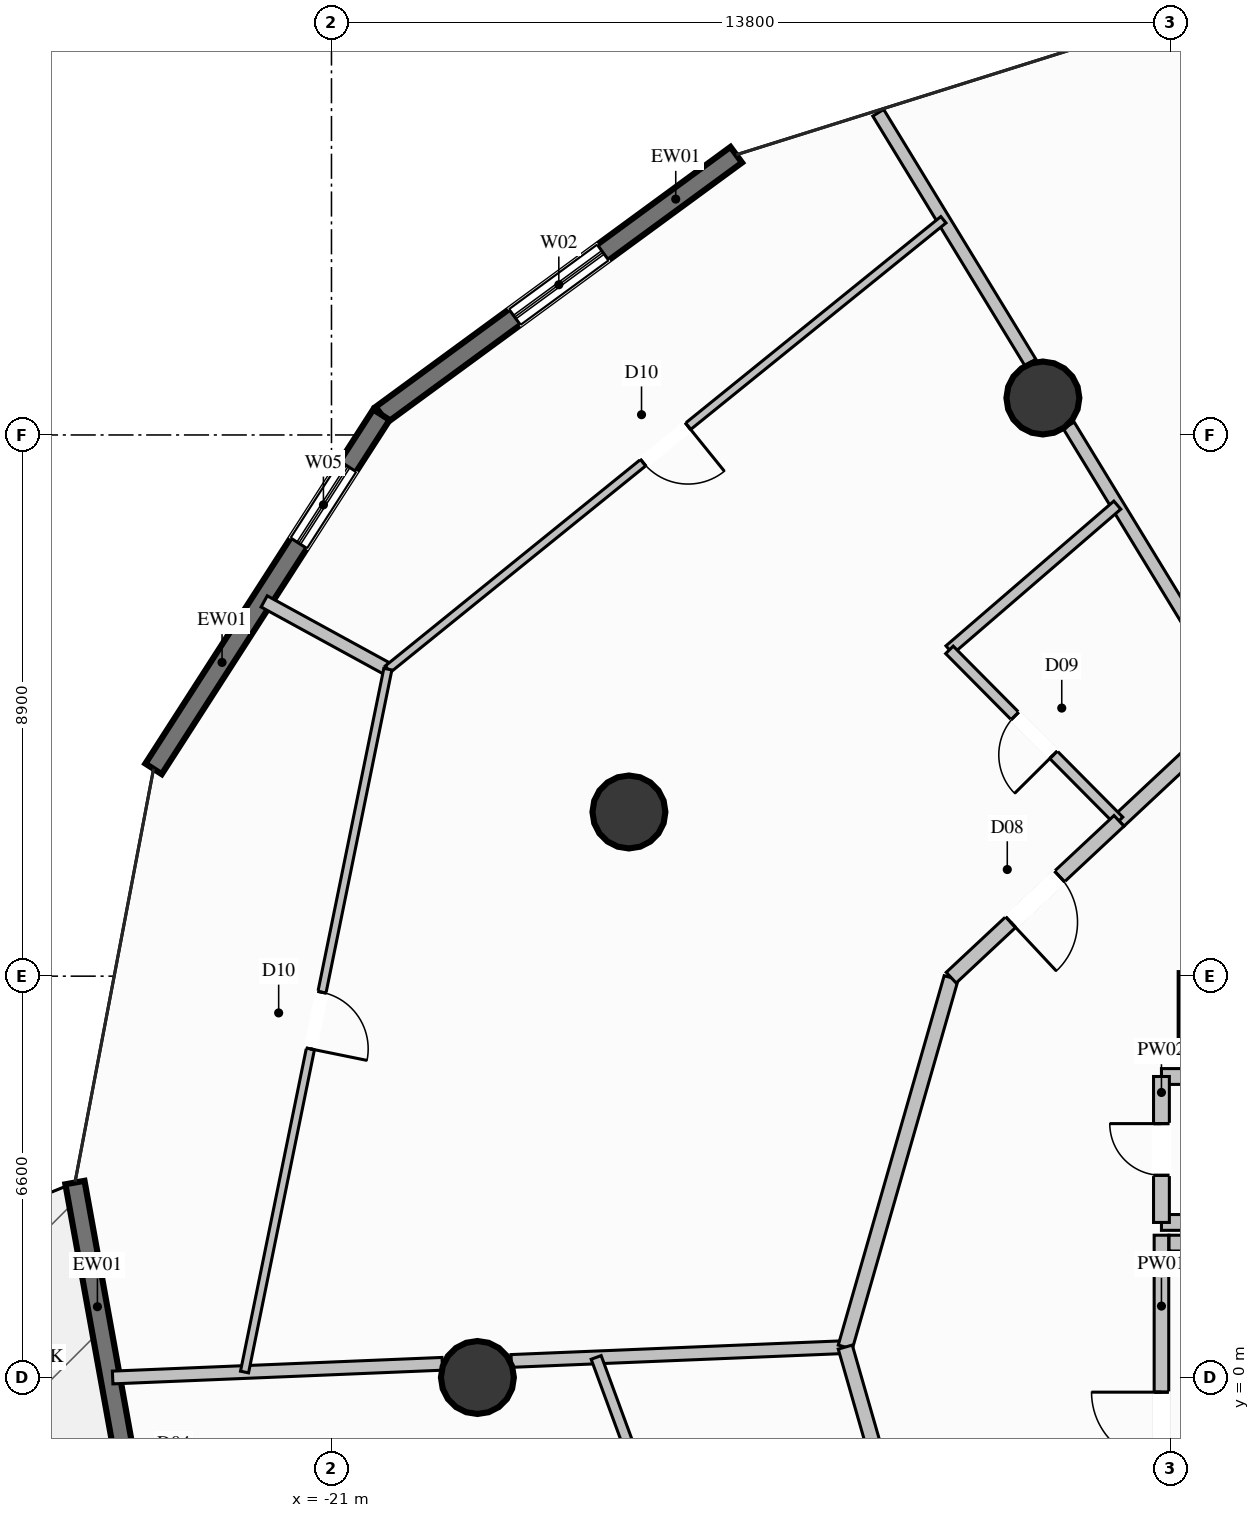
"""IFC4 building model, lengths in metres.
Left out: names, types, materials, properties, quantities, classifications, styles, units other than length and angle.
Written with IfcOpenShell. Run it as: python <this file> out.ifc"""

import sys

from ifc_helpers import new_model, si_unit, direction, frame, frame_2d, origin, origin_2d, place, context, subcontext, project, spatial, rectangle, circle, extrude, element, fill, save


model = new_model("IFC4")
c1 = context("Model", 3, precision=1e-05, world=origin(), true_north=direction((0.0, 1.0)))
c2 = subcontext(c1, "Body", "Model", "MODEL_VIEW")
j1 = project(units=[si_unit("LENGTHUNIT", "METRE"), si_unit("PLANEANGLEUNIT", "RADIAN")], contexts=[c1])
p1 = place(None, origin())
s1 = spatial("IfcSite", under=j1, at=p1, CompositionType="ELEMENT")
p2 = place(p1, origin())
s2 = spatial("IfcBuilding", under=s1, at=p2, CompositionType="ELEMENT")
p3 = place(p2, frame((0.0, 0.0, 78.8)))
s3 = spatial("IfcBuildingStorey", under=s2, at=p3, CompositionType="ELEMENT", Elevation=78.8)
p4 = place(p3, frame((-6.5, 6.1, 0.0), z_axis=(0.0, 0.0, 1.0), x_axis=(1.0, 0.0, 0.0)))
e1 = element("IfcColumn", 1, at=p4, inside=s3, PredefinedType="COLUMN", context=c2, shape_type="SweptSolid", body=[
    extrude(rectangle(XDim=1.1, YDim=1.1, at=origin_2d()), origin(), (0.0, 0.0, 1.0), 3.6),
])
for number, where, z_axis, x_axis in (
    (2, (-9.3, 16.108, 0.0), (0.0, 0.0, 1.0), (1.0, 0.0, 0.0)),
    (3, (-16.108, 9.3, 0.0), (0.0, 0.0, 1.0), (1.0, 0.0, 0.0)),
    (4, (-18.6, 0.0, 0.0), (0.0, 0.0, 1.0), (1.0, 0.0, 0.0)),
):
    element("IfcColumn", number, at=place(p3, frame(where, z_axis=z_axis, x_axis=x_axis)), inside=s3, PredefinedType="COLUMN", context=c2, shape_type="SweptSolid", body=[
        extrude(circle(Radius=0.6, at=origin_2d()), origin(), (0.0, 0.0, 1.0), 3.6),
    ])
p5 = place(p3, frame((-20.179, 15.833, 0.0), z_axis=(0.0, 0.0, 1.0), x_axis=(0.806720320821, 0.59093343447, 0.0)))
e5 = element("IfcWall", 5, at=p5, inside=s3, PredefinedType="SOLIDWALL", context=c2, shape_type="SweptSolid", body=[
    extrude(rectangle(XDim=7.234, YDim=0.32, at=frame_2d((3.617, 0.0))), origin(), (0.0, 0.0, 1.0), 3.34),
])
p6 = place(p5, frame((2.717, 0.0, 0.35)))
e6 = element("IfcOpeningElement", 6, at=p6, cuts=e5, PredefinedType="OPENING", context=c2, shape_type="SweptSolid", body=[
    extrude(rectangle(XDim=1.8, YDim=2.6, at=frame_2d((0.9, 1.3))), frame((0.0, 0.17, 0.0), z_axis=(0.0, -1.0, 0.0), x_axis=(1.0, 0.0, 0.0)), (0.0, 0.0, 1.0), 0.34),
])
p7 = place(p3, frame((-23.926, 10.009, 0.0), z_axis=(0.0, 0.0, 1.0), x_axis=(0.541072927061, 0.840975675987, 0.0)))
e7 = element("IfcWall", 7, at=p7, inside=s3, PredefinedType="SOLIDWALL", context=c2, shape_type="SweptSolid", body=[
    extrude(rectangle(XDim=6.925, YDim=0.32, at=frame_2d((3.463, 0.0))), origin(), (0.0, 0.0, 1.0), 3.34),
])
p8 = place(p7, frame((4.413, 0.0, 0.85)))
e8 = element("IfcOpeningElement", 8, at=p8, cuts=e7, PredefinedType="OPENING", context=c2, shape_type="SweptSolid", body=[
    extrude(rectangle(XDim=1.5, YDim=1.2, at=frame_2d((0.75, 0.6))), frame((0.0, 0.17, 0.0), z_axis=(0.0, -1.0, 0.0), x_axis=(1.0, 0.0, 0.0)), (0.0, 0.0, 1.0), 0.34),
])
p9 = place(p3, frame((-23.931, -3.912, 0.0), z_axis=(0.0, 0.0, 1.0), x_axis=(-0.178065653106, 0.984018609165, 0.0)))
e9 = element("IfcWall", 9, at=p9, inside=s3, PredefinedType="SOLIDWALL", context=c2, shape_type="SweptSolid", body=[
    extrude(rectangle(XDim=7.234, YDim=0.32, at=frame_2d((3.617, 0.0))), origin(), (0.0, 0.0, 1.0), 3.34),
])
p10 = place(p9, frame((1.234, 0.0, 0.0)))
e10 = element("IfcOpeningElement", 10, at=p10, cuts=e9, PredefinedType="OPENING", context=c2, shape_type="SweptSolid", body=[
    extrude(rectangle(XDim=1.6, YDim=2.3, at=frame_2d((0.8, 1.15))), frame((0.0, 0.17, 0.0), z_axis=(0.0, -1.0, 0.0), x_axis=(1.0, 0.0, 0.0)), (0.0, 0.0, 1.0), 0.34),
])
p11 = place(p3, frame((-7.35, -2.78, 0.0), z_axis=(0.0, 0.0, 1.0), x_axis=(0.0, 1.0, 0.0)))
e11 = element("IfcWall", 11, at=p11, inside=s3, PredefinedType="PARTITIONING", context=c2, shape_type="SweptSolid", body=[
    extrude(rectangle(XDim=5.12, YDim=0.24, at=frame_2d((2.56, 0.0))), origin(), (0.0, 0.0, 1.0), 2.425),
])
p12 = place(p11, frame((1.389, 0.0, 0.0)))
e12 = element("IfcOpeningElement", 12, at=p12, cuts=e11, PredefinedType="OPENING", context=c2, shape_type="SweptSolid", body=[
    extrude(rectangle(XDim=1.15, YDim=2.2, at=frame_2d((0.575, 1.1))), frame((0.0, 0.13, 0.0), z_axis=(0.0, -1.0, 0.0), x_axis=(1.0, 0.0, 0.0)), (0.0, 0.0, 1.0), 0.26),
])
p13 = place(p3, frame((-7.225, 2.21, 0.0), z_axis=(0.0, 0.0, 1.0), x_axis=(1.0, 0.0, 0.0)))
e13 = element("IfcWall", 13, at=p13, inside=s3, PredefinedType="PARTITIONING", context=c2, shape_type="SweptSolid", body=[
    extrude(rectangle(XDim=0.875, YDim=0.26, at=frame_2d((0.438, 0.0))), origin(), (0.0, 0.0, 1.0), 3.34),
])
for number, where, z_axis, x_axis in (
    (14, (-7.35, 4.95, 0.0), (0.0, 0.0, 1.0), (1.0, 0.0, 0.0)),
    (15, (-7.35, 2.55, 0.0), (0.0, 0.0, 1.0), (1.0, 0.0, 0.0)),
):
    element("IfcWall", number, at=place(p3, frame(where, z_axis=z_axis, x_axis=x_axis)), inside=s3, PredefinedType="PARTITIONING", context=c2, shape_type="SweptSolid", body=[
        extrude(rectangle(XDim=0.93, YDim=0.26, at=frame_2d((0.465, 0.0))), origin(), (0.0, 0.0, 1.0), 3.34),
    ])
p14 = place(p3, frame((-7.35, 2.55, 0.0), z_axis=(0.0, 0.0, 1.0), x_axis=(0.0, 1.0, 0.0)))
e16 = element("IfcWall", 16, at=p14, inside=s3, PredefinedType="PARTITIONING", context=c2, shape_type="SweptSolid", body=[
    extrude(rectangle(XDim=2.4, YDim=0.26, at=frame_2d((1.2, 0.0))), origin(), (0.0, 0.0, 1.0), 2.425),
])
p15 = place(p14, frame((0.775, 0.0, 0.0)))
e17 = element("IfcOpeningElement", 17, at=p15, cuts=e16, PredefinedType="OPENING", context=c2, shape_type="SweptSolid", body=[
    extrude(rectangle(XDim=0.85, YDim=2.05, at=frame_2d((0.425, 1.025))), frame((0.0, 0.14, 0.0), z_axis=(0.0, -1.0, 0.0), x_axis=(1.0, 0.0, 0.0)), (0.0, 0.0, 1.0), 0.28),
])
p16 = place(p3, frame((-6.05, 11.022, 0.0), z_axis=(0.0, 0.0, 1.0), x_axis=(-0.520436280321, 0.85390050833, 0.0)))
e18 = element("IfcWall", 18, at=p16, inside=s3, PredefinedType="PARTITIONING", context=c2, shape_type="SweptSolid", body=[
    extrude(rectangle(XDim=5.428, YDim=0.21, at=frame_2d((2.714, 0.0))), origin(), (0.0, 0.0, 1.0), 2.708),
])
p17 = place(p3, frame((-9.506, 16.693, 0.0), z_axis=(0.0, 0.0, 1.0), x_axis=(-0.52035281633, 0.853951372467, 0.0)))
e19 = element("IfcWall", 19, at=p17, inside=s3, PredefinedType="PARTITIONING", context=c2, shape_type="SweptSolid", body=[
    extrude(rectangle(XDim=4.808, YDim=0.21, at=frame_2d((2.404, 0.0))), origin(), (0.0, 0.0, 1.0), 3.34),
])
p18 = place(p3, frame((-12.55, 0.5, 0.0), z_axis=(0.0, 0.0, 1.0), x_axis=(-0.999139449334, -0.041477232129, 0.0)))
e20 = element("IfcWall", 20, at=p18, inside=s3, PredefinedType="PARTITIONING", context=c2, shape_type="SweptSolid", body=[
    extrude(rectangle(XDim=5.498, YDim=0.21, at=frame_2d((2.749, 0.0))), origin(), (0.0, 0.0, 1.0), 2.421),
])
p19 = place(p3, frame((-19.178, 0.225, 0.0), z_axis=(0.0, 0.0, 1.0), x_axis=(-0.999139067382, -0.04148643189, 0.0)))
e21 = element("IfcWall", 21, at=p19, inside=s3, PredefinedType="PARTITIONING", context=c2, shape_type="SweptSolid", body=[
    extrude(rectangle(XDim=5.426, YDim=0.21, at=frame_2d((2.713, 0.0))), origin(), (0.0, 0.0, 1.0), 2.421),
])
p20 = place(p3, frame((-6.05, 11.022, 0.0), z_axis=(0.0, 0.0, 1.0), x_axis=(-0.730494026404, -0.682919085535, 0.0)))
e22 = element("IfcWall", 22, at=p20, inside=s3, PredefinedType="PARTITIONING", context=c2, shape_type="SweptSolid", body=[
    extrude(rectangle(XDim=2.735, YDim=0.24, at=frame_2d((1.368, 0.0))), origin(), (0.0, 0.0, 1.0), 3.34),
])
p21 = place(p3, frame((-8.076, 14.346, 0.0), z_axis=(0.0, 0.0, 1.0), x_axis=(-0.757447652271, -0.652895898341, 0.0)))
e23 = element("IfcWall", 23, at=p21, inside=s3, PredefinedType="PLUMBINGWALL", context=c2, shape_type="SweptSolid", body=[
    extrude(rectangle(XDim=3.645, YDim=0.175, at=frame_2d((1.823, 0.0))), origin(), (0.0, 0.0, 1.0), 3.34),
])
p22 = place(p3, frame((-8.048, 9.154, 0.0), z_axis=(0.0, 0.0, 1.0), x_axis=(-0.704172573675, 0.710028863135, 0.0)))
e24 = element("IfcWall", 24, at=p22, inside=s3, PredefinedType="PLUMBINGWALL", context=c2, shape_type="SweptSolid", body=[
    extrude(rectangle(XDim=3.96, YDim=0.175, at=frame_2d((1.98, 0.0))), origin(), (0.0, 0.0, 1.0), 3.34),
])
p23 = place(p22, frame((1.53, 0.0, 0.0)))
e25 = element("IfcOpeningElement", 25, at=p23, cuts=e24, PredefinedType="OPENING", context=c2, shape_type="SweptSolid", body=[
    extrude(rectangle(XDim=0.9, YDim=2.1, at=frame_2d((0.45, 1.05))), frame((0.0, 0.098, 0.0), z_axis=(0.0, -1.0, 0.0), x_axis=(1.0, 0.0, 0.0)), (0.0, 0.0, 1.0), 0.195),
])
p24 = place(p3, frame((-20.073, 11.649, 0.0), z_axis=(0.0, 0.0, 1.0), x_axis=(-0.877061418116, 0.480378256015, 0.0)))
e26 = element("IfcWall", 26, at=p24, inside=s3, PredefinedType="PARTITIONING", context=c2, shape_type="SweptSolid", body=[
    extrude(rectangle(XDim=2.319, YDim=0.21, at=frame_2d((1.16, 0.0))), origin(), (0.0, 0.0, 1.0), 3.34),
])
p25 = place(p3, frame((-10.808, 6.575, 0.0), z_axis=(0.0, 0.0, 1.0), x_axis=(-0.275634306148, -0.961262570412, 0.0)))
e27 = element("IfcWall", 27, at=p25, inside=s3, PredefinedType="PARTITIONING", context=c2, shape_type="SweptSolid", body=[
    extrude(rectangle(XDim=6.32, YDim=0.24, at=frame_2d((3.16, 0.0))), origin(), (0.0, 0.0, 1.0), 3.34),
])
p26 = place(p3, frame((-8.048, 9.154, 0.0), z_axis=(0.0, 0.0, 1.0), x_axis=(-0.73064678366, -0.682755649941, 0.0)))
e28 = element("IfcWall", 28, at=p26, inside=s3, PredefinedType="PARTITIONING", context=c2, shape_type="SweptSolid", body=[
    extrude(rectangle(XDim=3.778, YDim=0.24, at=frame_2d((1.889, 0.0))), origin(), (0.0, 0.0, 1.0), 3.34),
])
p27 = place(p26, frame((1.339, 0.0, 0.0)))
e29 = element("IfcOpeningElement", 29, at=p27, cuts=e28, PredefinedType="OPENING", context=c2, shape_type="SweptSolid", body=[
    extrude(rectangle(XDim=1.1, YDim=2.3, at=frame_2d((0.55, 1.15))), frame((0.0, 0.13, 0.0), z_axis=(0.0, -1.0, 0.0), x_axis=(1.0, 0.0, 0.0)), (0.0, 0.0, 1.0), 0.26),
])
p28 = place(p3, frame((-10.936, 19.039, 0.0), z_axis=(0.0, 0.0, 1.0), x_axis=(-0.777513312779, -0.628866479033, 0.0)))
e30 = element("IfcWall", 30, at=p28, inside=s3, PredefinedType="PARTITIONING", context=c2, shape_type="SweptSolid", body=[
    extrude(rectangle(XDim=11.751, YDim=0.135, at=frame_2d((5.876, 0.0))), origin(), (0.0, 0.0, 1.0), 3.34),
])
p29 = place(p28, frame((5.401, 0.0, 0.0)))
e31 = element("IfcOpeningElement", 31, at=p29, cuts=e30, PredefinedType="OPENING", context=c2, shape_type="SweptSolid", body=[
    extrude(rectangle(XDim=0.95, YDim=2.1, at=frame_2d((0.475, 1.05))), frame((0.0, 0.078, 0.0), z_axis=(0.0, -1.0, 0.0), x_axis=(1.0, 0.0, 0.0)), (0.0, 0.0, 1.0), 0.155),
])
p30 = place(p3, frame((-20.073, 11.649, 0.0), z_axis=(0.0, 0.0, 1.0), x_axis=(-0.199796197969, -0.979837475951, 0.0)))
e32 = element("IfcWall", 32, at=p30, inside=s3, PredefinedType="PARTITIONING", context=c2, shape_type="SweptSolid", body=[
    extrude(rectangle(XDim=11.797, YDim=0.135, at=frame_2d((5.898, 0.0))), origin(), (0.0, 0.0, 1.0), 3.34),
])
p31 = place(p30, frame((5.423, 0.0, 0.0)))
e33 = element("IfcOpeningElement", 33, at=p31, cuts=e32, PredefinedType="OPENING", context=c2, shape_type="SweptSolid", body=[
    extrude(rectangle(XDim=0.95, YDim=2.1, at=frame_2d((0.475, 1.05))), frame((0.0, 0.078, 0.0), z_axis=(0.0, -1.0, 0.0), x_axis=(1.0, 0.0, 0.0)), (0.0, 0.0, 1.0), 0.155),
])
p32 = place(p3, frame((-12.55, 0.5, 0.0), z_axis=(0.0, 0.0, 1.0), x_axis=(0.275790140823, -0.961217872402, 0.0)))
e34 = element("IfcWall", 34, at=p32, inside=s3, PredefinedType="PARTITIONING", context=c2, shape_type="SweptSolid", body=[
    extrude(rectangle(XDim=2.654, YDim=0.24, at=frame_2d((1.327, 0.0))), origin(), (0.0, 0.0, 1.0), 3.34),
])
p33 = place(p3, frame((-16.647, 0.33, 0.0), z_axis=(0.0, 0.0, 1.0), x_axis=(0.345227943429, -0.93851886879, 0.0)))
e35 = element("IfcWall", 35, at=p33, inside=s3, PredefinedType="PLUMBINGWALL", context=c2, shape_type="SweptSolid", body=[
    extrude(rectangle(XDim=3.508, YDim=0.175, at=frame_2d((1.754, 0.0))), origin(), (0.0, 0.0, 1.0), 3.34),
])
p34 = place(p6, origin())
e36 = element("IfcWindow", 36, at=p34, inside=s3, PartitioningType="SINGLE_PANEL", PredefinedType="WINDOW", context=c2, shape_type="SweptSolid", body=[
    extrude(rectangle(XDim=1.8, YDim=2.6, at=frame_2d((0.9, 1.3))), frame((0.0, 0.03, 0.0), z_axis=(0.0, -1.0, 0.0), x_axis=(1.0, 0.0, 0.0)), (0.0, 0.0, 1.0), 0.06),
])
fill(e6, e36)
p35 = place(p8, origin())
e37 = element("IfcWindow", 37, at=p35, inside=s3, PartitioningType="SINGLE_PANEL", PredefinedType="WINDOW", context=c2, shape_type="SweptSolid", body=[
    extrude(rectangle(XDim=1.5, YDim=1.2, at=frame_2d((0.75, 0.6))), frame((0.0, 0.03, 0.0), z_axis=(0.0, -1.0, 0.0), x_axis=(1.0, 0.0, 0.0)), (0.0, 0.0, 1.0), 0.06),
])
fill(e8, e37)
p36 = place(p12, origin())
e38 = element("IfcDoor", 38, at=p36, inside=s3, OperationType="SINGLE_SWING_RIGHT", PredefinedType="DOOR", context=c2, shape_type="SweptSolid", body=[
    extrude(rectangle(XDim=1.15, YDim=2.2, at=frame_2d((0.575, 1.1))), frame((0.0, 0.025, 0.0), z_axis=(0.0, -1.0, 0.0), x_axis=(1.0, 0.0, 0.0)), (0.0, 0.0, 1.0), 0.05),
])
fill(e12, e38)
p37 = place(p15, origin())
e39 = element("IfcDoor", 39, at=p37, inside=s3, OperationType="SINGLE_SWING_RIGHT", PredefinedType="DOOR", context=c2, shape_type="SweptSolid", body=[
    extrude(rectangle(XDim=0.85, YDim=2.05, at=frame_2d((0.425, 1.025))), frame((0.0, 0.025, 0.0), z_axis=(0.0, -1.0, 0.0), x_axis=(1.0, 0.0, 0.0)), (0.0, 0.0, 1.0), 0.05),
])
fill(e17, e39)
p38 = place(p23, origin())
e40 = element("IfcDoor", 40, at=p38, inside=s3, OperationType="SINGLE_SWING_LEFT", PredefinedType="DOOR", context=c2, shape_type="SweptSolid", body=[
    extrude(rectangle(XDim=0.9, YDim=2.1, at=frame_2d((0.45, 1.05))), frame((0.0, 0.025, 0.0), z_axis=(0.0, -1.0, 0.0), x_axis=(1.0, 0.0, 0.0)), (0.0, 0.0, 1.0), 0.05),
])
fill(e25, e40)
p39 = place(p27, origin())
e41 = element("IfcDoor", 41, at=p39, inside=s3, OperationType="SINGLE_SWING_RIGHT", PredefinedType="DOOR", context=c2, shape_type="SweptSolid", body=[
    extrude(rectangle(XDim=1.1, YDim=2.3, at=frame_2d((0.55, 1.15))), frame((0.0, 0.025, 0.0), z_axis=(0.0, -1.0, 0.0), x_axis=(1.0, 0.0, 0.0)), (0.0, 0.0, 1.0), 0.05),
])
fill(e29, e41)
p40 = place(p29, origin())
e42 = element("IfcDoor", 42, at=p40, inside=s3, OperationType="SINGLE_SWING_LEFT", PredefinedType="DOOR", context=c2, shape_type="SweptSolid", body=[
    extrude(rectangle(XDim=0.95, YDim=2.1, at=frame_2d((0.475, 1.05))), frame((0.0, 0.025, 0.0), z_axis=(0.0, -1.0, 0.0), x_axis=(1.0, 0.0, 0.0)), (0.0, 0.0, 1.0), 0.05),
])
fill(e31, e42)
p41 = place(p31, origin())
e43 = element("IfcDoor", 43, at=p41, inside=s3, OperationType="SINGLE_SWING_RIGHT", PredefinedType="DOOR", context=c2, shape_type="SweptSolid", body=[
    extrude(rectangle(XDim=0.95, YDim=2.1, at=frame_2d((0.475, 1.05))), frame((0.0, 0.025, 0.0), z_axis=(0.0, -1.0, 0.0), x_axis=(1.0, 0.0, 0.0)), (0.0, 0.0, 1.0), 0.05),
])
fill(e33, e43)
save(model, sys.argv[1])
